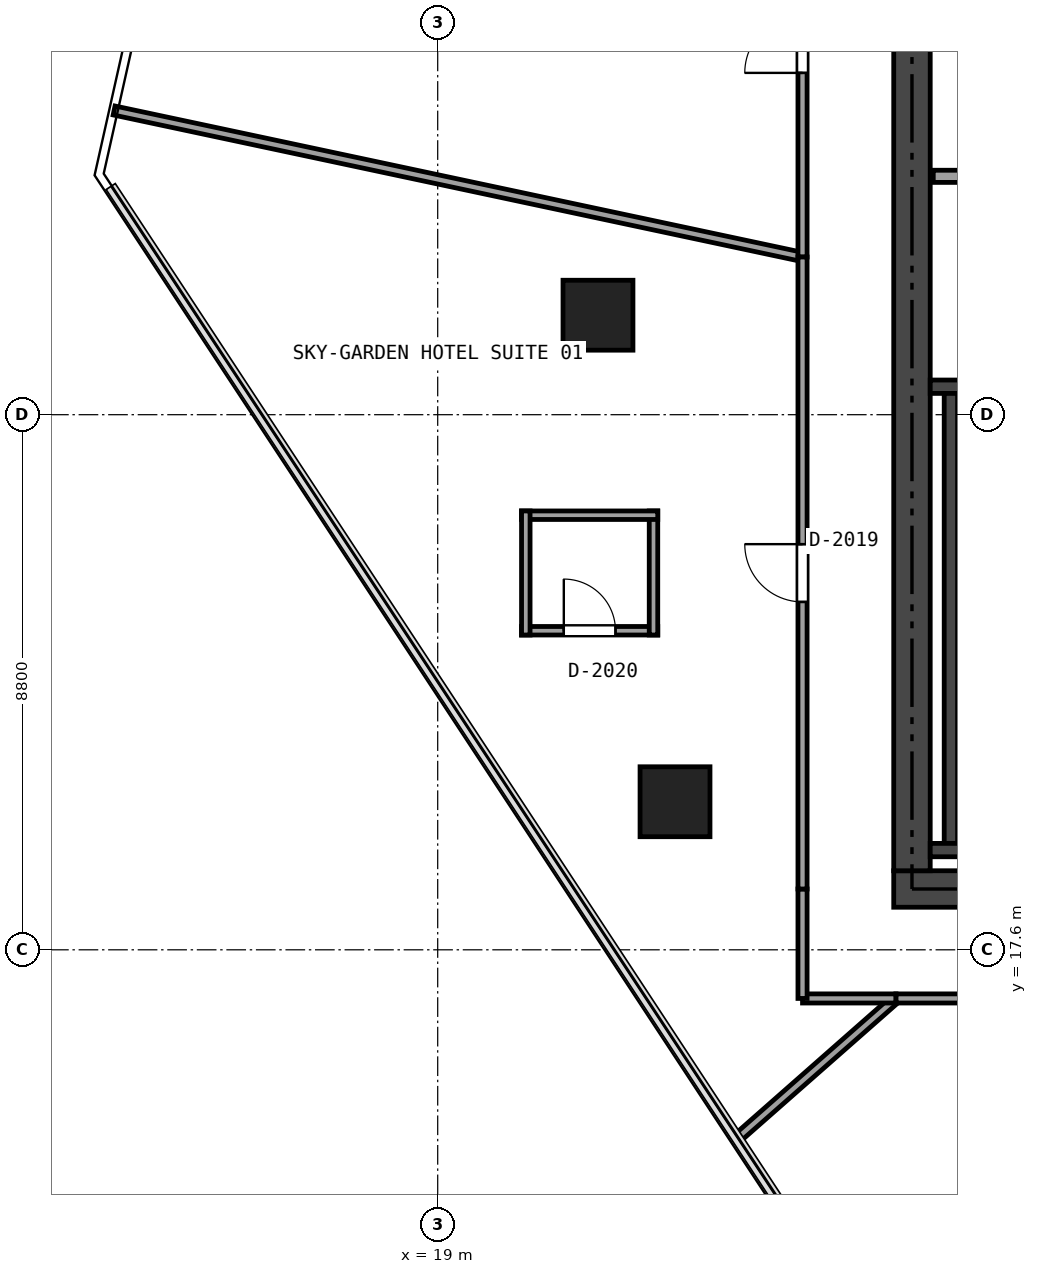
"""IFC4 building model, lengths in metres.
Left out: names, types, materials, properties, quantities, classifications, styles, units other than length and angle.
Written with IfcOpenShell. Run it as: python <this file> out.ifc"""

import sys

from ifc_helpers import new_model, si_unit, direction, frame, frame_2d, origin, origin_2d, place, context, subcontext, project, spatial, rectangle, extrude, element, fill, save


model = new_model("IFC4")
c1 = context("Model", 3, precision=1e-05, world=origin(), true_north=direction((0.0, 1.0)))
c2 = subcontext(c1, "Body", "Model", "MODEL_VIEW")
j1 = project(units=[si_unit("LENGTHUNIT", "METRE"), si_unit("PLANEANGLEUNIT", "RADIAN")], contexts=[c1])
p1 = place(None, origin())
s1 = spatial("IfcSite", under=j1, at=p1, CompositionType="ELEMENT")
p2 = place(p1, origin())
s2 = spatial("IfcBuilding", under=s1, at=p2, CompositionType="ELEMENT")
p3 = place(p2, frame((0.0, 0.0, 79.8)))
s3 = spatial("IfcBuildingStorey", under=s2, at=p3, CompositionType="ELEMENT", Elevation=79.8)
p4 = place(p3, frame((26.5, 18.6, 0.0), z_axis=(0.0, 0.0, 1.0), x_axis=(1.0, 0.0, 0.0)))
e1 = element("IfcWall", 1, at=p4, inside=s3, PredefinedType="SHEAR", context=c2, shape_type="SweptSolid", body=[
    extrude(rectangle(XDim=21.4, YDim=0.6, at=frame_2d((10.7, 0.0))), origin(), (0.0, 0.0, 1.0), 3.17),
])
p5 = place(p4, frame((12.425, 0.0, 0.0)))
e2 = element("IfcOpeningElement", 2, at=p5, cuts=e1, PredefinedType="OPENING", context=c2, shape_type="SweptSolid", body=[
    extrude(rectangle(XDim=1.15, YDim=2.15, at=frame_2d((0.575, 1.075))), frame((0.0, 0.31, 0.0), z_axis=(0.0, -1.0, 0.0), x_axis=(1.0, 0.0, 0.0)), (0.0, 0.0, 1.0), 0.62),
])
p6 = place(p4, frame((5.25, 0.0, 0.0)))
e3 = element("IfcOpeningElement", 3, at=p6, cuts=e1, PredefinedType="OPENING", context=c2, shape_type="SweptSolid", body=[
    extrude(rectangle(XDim=0.9, YDim=2.1, at=frame_2d((0.45, 1.05))), frame((0.0, 0.31, 0.0), z_axis=(0.0, -1.0, 0.0), x_axis=(1.0, 0.0, 0.0)), (0.0, 0.0, 1.0), 0.62),
])
p7 = place(p3, frame((26.8, 18.9, 0.0), z_axis=(0.0, 0.0, 1.0), x_axis=(0.0, 1.0, 0.0)))
e4 = element("IfcWall", 4, at=p7, inside=s3, PredefinedType="SHEAR", context=c2, shape_type="SweptSolid", body=[
    extrude(rectangle(XDim=15.0, YDim=0.6, at=frame_2d((7.5, 0.0))), origin(), (0.0, 0.0, 1.0), 3.17),
])
p8 = place(p3, frame((27.1, 26.86, 0.0), z_axis=(0.0, 0.0, 1.0), x_axis=(1.0, 0.0, 0.0)))
e5 = element("IfcWall", 5, at=p8, inside=s3, PredefinedType="SHEAR", context=c2, shape_type="SweptSolid", body=[
    extrude(rectangle(XDim=3.45, YDim=0.22, at=frame_2d((1.725, 0.0))), origin(), (0.0, 0.0, 1.0), 3.17),
])
p9 = place(p3, frame((27.44, 19.35, 0.0), z_axis=(0.0, 0.0, 1.0), x_axis=(0.0, 1.0, 0.0)))
e6 = element("IfcWall", 6, at=p9, inside=s3, PredefinedType="SHEAR", context=c2, shape_type="SweptSolid", body=[
    extrude(rectangle(XDim=7.4, YDim=0.22, at=frame_2d((3.7, 0.0))), origin(), (0.0, 0.0, 1.0), 3.17),
])
p10 = place(p3, frame((27.1, 19.24, 0.0), z_axis=(0.0, 0.0, 1.0), x_axis=(1.0, 0.0, 0.0)))
e7 = element("IfcWall", 7, at=p10, inside=s3, PredefinedType="SHEAR", context=c2, shape_type="SweptSolid", body=[
    extrude(rectangle(XDim=3.45, YDim=0.22, at=frame_2d((1.725, 0.0))), origin(), (0.0, 0.0, 1.0), 3.17),
])
for number, where, z_axis, x_axis in (
    (8, (21.636, 28.036, 0.0), (0.0, 0.0, 1.0), (1.0, 0.0, 0.0)),
    (9, (22.903, 20.035, 0.0), (0.0, 0.0, 1.0), (1.0, 0.0, 0.0)),
):
    element("IfcColumn", number, at=place(p3, frame(where, z_axis=z_axis, x_axis=x_axis)), inside=s3, PredefinedType="COLUMN", context=c2, shape_type="SweptSolid", body=[
        extrude(rectangle(XDim=1.15, YDim=1.15, at=origin_2d()), origin(), (0.0, 0.0, 1.0), 3.17),
    ])
p11 = place(p3, frame((27.15, 30.32, 0.0), z_axis=(0.0, 0.0, 1.0), x_axis=(1.0, 0.0, 0.0)))
e10 = element("IfcWall", 10, at=p11, inside=s3, PredefinedType="SOLIDWALL", context=c2, shape_type="SweptSolid", body=[
    extrude(rectangle(XDim=3.45, YDim=0.2, at=frame_2d((1.725, 0.0))), origin(), (0.0, 0.0, 1.0), 3.17),
])
p12 = place(p3, frame((20.379, 22.847, 0.0), z_axis=(0.0, 0.0, 1.0), x_axis=(1.0, 0.0, 0.0)))
e11 = element("IfcWall", 11, at=p12, inside=s3, PredefinedType="PARTITIONING", context=c2, shape_type="SweptSolid", body=[
    extrude(rectangle(XDim=2.24, YDim=0.14, at=frame_2d((1.12, 0.0))), origin(), (0.0, 0.0, 1.0), 2.455),
])
p13 = place(p12, frame((0.695, 0.0, 0.0)))
e12 = element("IfcOpeningElement", 12, at=p13, cuts=e11, PredefinedType="OPENING", context=c2, shape_type="SweptSolid", body=[
    extrude(rectangle(XDim=0.85, YDim=2.1, at=frame_2d((0.425, 1.05))), frame((0.0, 0.08, 0.0), z_axis=(0.0, -1.0, 0.0), x_axis=(1.0, 0.0, 0.0)), (0.0, 0.0, 1.0), 0.16),
])
p14 = place(p3, frame((22.549, 22.777, 0.0), z_axis=(0.0, 0.0, 1.0), x_axis=(0.0, 1.0, 0.0)))
e13 = element("IfcWall", 13, at=p14, inside=s3, PredefinedType="PARTITIONING", context=c2, shape_type="SweptSolid", body=[
    extrude(rectangle(XDim=2.04, YDim=0.14, at=frame_2d((1.02, 0.0))), origin(), (0.0, 0.0, 1.0), 2.455),
])
p15 = place(p3, frame((22.619, 24.747, 0.0), z_axis=(0.0, 0.0, 1.0), x_axis=(-1.0, 0.0, 0.0)))
e14 = element("IfcWall", 14, at=p15, inside=s3, PredefinedType="PARTITIONING", context=c2, shape_type="SweptSolid", body=[
    extrude(rectangle(XDim=2.24, YDim=0.14, at=frame_2d((1.12, 0.0))), origin(), (0.0, 0.0, 1.0), 2.455),
])
p16 = place(p3, frame((20.449, 24.817, 0.0), z_axis=(0.0, 0.0, 1.0), x_axis=(0.0, -1.0, 0.0)))
e15 = element("IfcWall", 15, at=p16, inside=s3, PredefinedType="PARTITIONING", context=c2, shape_type="SweptSolid", body=[
    extrude(rectangle(XDim=2.04, YDim=0.14, at=frame_2d((1.02, 0.0))), origin(), (0.0, 0.0, 1.0), 3.17),
])
p17 = place(p3, frame((13.678, 31.403, 0.0), z_axis=(0.0, 0.0, 1.0), x_axis=(0.978084549895, -0.208208100842, 0.0)))
e16 = element("IfcWall", 16, at=p17, inside=s3, PredefinedType="PARTITIONING", context=c2, shape_type="SweptSolid", body=[
    extrude(rectangle(XDim=11.576, YDim=0.15, at=frame_2d((5.788, 0.0))), origin(), (0.0, 0.0, 1.0), 2.455),
])
p18 = place(p3, frame((25.0, 28.993, 0.0), z_axis=(0.0, 0.0, 1.0), x_axis=(0.0, 1.0, 0.0)))
e17 = element("IfcWall", 17, at=p18, inside=s3, PredefinedType="PARTITIONING", context=c2, shape_type="SweptSolid", body=[
    extrude(rectangle(XDim=7.007, YDim=0.15, at=frame_2d((3.503, 0.0))), origin(), (0.0, 0.0, 1.0), 2.455),
])
p19 = place(p18, frame((3.028, 0.0, 0.0)))
e18 = element("IfcOpeningElement", 18, at=p19, cuts=e17, PredefinedType="OPENING", context=c2, shape_type="SweptSolid", body=[
    extrude(rectangle(XDim=0.95, YDim=2.15, at=frame_2d((0.475, 1.075))), frame((0.0, 0.085, 0.0), z_axis=(0.0, -1.0, 0.0), x_axis=(1.0, 0.0, 0.0)), (0.0, 0.0, 1.0), 0.17),
])
p20 = place(p3, frame((23.895, 14.475, 0.0), z_axis=(0.0, 0.0, 1.0), x_axis=(0.750846960114, 0.660476224013, 0.0)))
e19 = element("IfcWall", 19, at=p20, inside=s3, PredefinedType="PARTITIONING", context=c2, shape_type="SweptSolid", body=[
    extrude(rectangle(XDim=3.52, YDim=0.15, at=frame_2d((1.76, 0.0))), origin(), (0.0, 0.0, 1.0), 2.455),
])
p21 = place(p3, frame((26.538, 16.8, 0.0), z_axis=(0.0, 0.0, 1.0), x_axis=(-1.0, 0.0, 0.0)))
e20 = element("IfcWall", 20, at=p21, inside=s3, PredefinedType="PARTITIONING", context=c2, shape_type="SweptSolid", body=[
    extrude(rectangle(XDim=1.538, YDim=0.15, at=frame_2d((0.769, 0.0))), origin(), (0.0, 0.0, 1.0), 2.455),
])
p22 = place(p3, frame((25.0, 16.8, 0.0), z_axis=(0.0, 0.0, 1.0), x_axis=(0.0, 1.0, 0.0)))
e21 = element("IfcWall", 21, at=p22, inside=s3, PredefinedType="PARTITIONING", context=c2, shape_type="SweptSolid", body=[
    extrude(rectangle(XDim=1.8, YDim=0.15, at=frame_2d((0.9, 0.0))), origin(), (0.0, 0.0, 1.0), 2.455),
])
p23 = place(p3, frame((25.0, 18.6, 0.0), z_axis=(0.0, 0.0, 1.0), x_axis=(0.0, 1.0, 0.0)))
e22 = element("IfcWall", 22, at=p23, inside=s3, PredefinedType="PARTITIONING", context=c2, shape_type="SweptSolid", body=[
    extrude(rectangle(XDim=10.393, YDim=0.15, at=frame_2d((5.196, 0.0))), origin(), (0.0, 0.0, 1.0), 2.467),
])
p24 = place(p23, frame((4.721, 0.0, 0.0)))
e23 = element("IfcOpeningElement", 23, at=p24, cuts=e22, PredefinedType="OPENING", context=c2, shape_type="SweptSolid", body=[
    extrude(rectangle(XDim=0.95, YDim=2.15, at=frame_2d((0.475, 1.075))), frame((0.0, 0.085, 0.0), z_axis=(0.0, -1.0, 0.0), x_axis=(1.0, 0.0, 0.0)), (0.0, 0.0, 1.0), 0.17),
])
p25 = place(p3, frame((38.209, 16.8, 0.0), z_axis=(0.0, 0.0, 1.0), x_axis=(-1.0, 0.0, 0.0)))
e24 = element("IfcWall", 24, at=p25, inside=s3, PredefinedType="PARTITIONING", context=c2, shape_type="SweptSolid", body=[
    extrude(rectangle(XDim=11.671, YDim=0.15, at=frame_2d((5.835, 0.0))), origin(), (0.0, 0.0, 1.0), 2.455),
])
p26 = place(p25, frame((5.361, 0.0, 0.0)))
e25 = element("IfcOpeningElement", 25, at=p26, cuts=e24, PredefinedType="OPENING", context=c2, shape_type="SweptSolid", body=[
    extrude(rectangle(XDim=0.95, YDim=2.15, at=frame_2d((0.475, 1.075))), frame((0.0, 0.085, 0.0), z_axis=(0.0, -1.0, 0.0), x_axis=(1.0, 0.0, 0.0)), (0.0, 0.0, 1.0), 0.17),
])
p27 = place(p19, origin())
e26 = element("IfcDoor", 26, at=p27, inside=s3, OperationType="SINGLE_SWING_LEFT", PredefinedType="DOOR", context=c2, shape_type="SweptSolid", body=[
    extrude(rectangle(XDim=0.95, YDim=2.15, at=frame_2d((0.475, 1.075))), frame((0.0, 0.025, 0.0), z_axis=(0.0, -1.0, 0.0), x_axis=(1.0, 0.0, 0.0)), (0.0, 0.0, 1.0), 0.05),
])
fill(e18, e26)
p28 = place(p24, origin())
e27 = element("IfcDoor", 27, at=p28, inside=s3, OperationType="SINGLE_SWING_RIGHT", PredefinedType="DOOR", context=c2, shape_type="SweptSolid", body=[
    extrude(rectangle(XDim=0.95, YDim=2.15, at=frame_2d((0.475, 1.075))), frame((0.0, 0.025, 0.0), z_axis=(0.0, -1.0, 0.0), x_axis=(1.0, 0.0, 0.0)), (0.0, 0.0, 1.0), 0.05),
])
fill(e23, e27)
p29 = place(p13, origin())
e28 = element("IfcDoor", 28, at=p29, inside=s3, OperationType="SINGLE_SWING_LEFT", PredefinedType="DOOR", context=c2, shape_type="SweptSolid", body=[
    extrude(rectangle(XDim=0.85, YDim=2.1, at=frame_2d((0.425, 1.05))), frame((0.0, 0.025, 0.0), z_axis=(0.0, -1.0, 0.0), x_axis=(1.0, 0.0, 0.0)), (0.0, 0.0, 1.0), 0.05),
])
fill(e12, e28)
save(model, sys.argv[1])
